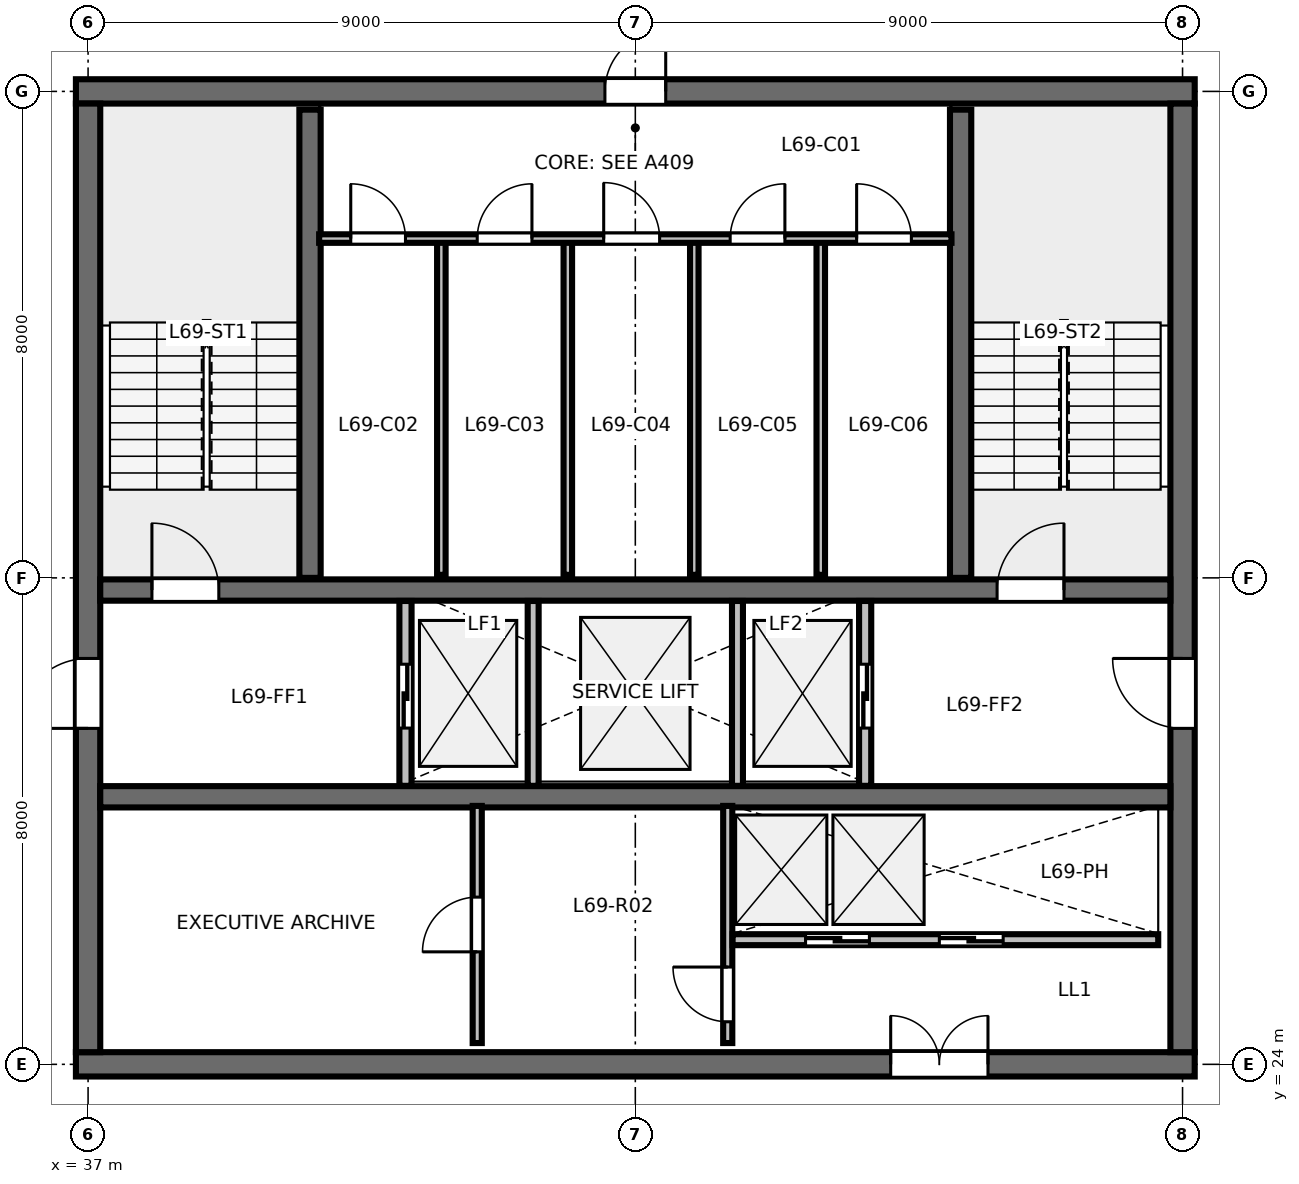
"""IFC4 building model, lengths in metres.
Left out: names, types, materials, properties, quantities, classifications, styles, units other than length and angle.
Written with IfcOpenShell. Run it as: python <this file> out.ifc"""

import sys

from ifc_helpers import new_model, si_unit, direction, frame, frame_2d, origin, place, context, subcontext, project, spatial, rectangle, extrude, element, fill, save


model = new_model("IFC4")
c1 = context("Model", 3, precision=1e-05, world=origin(), true_north=direction((0.0, 1.0)))
c2 = subcontext(c1, "Body", "Model", "MODEL_VIEW")
j1 = project(units=[si_unit("LENGTHUNIT", "METRE"), si_unit("PLANEANGLEUNIT", "RADIAN")], contexts=[c1])
p1 = place(None, origin())
s1 = spatial("IfcSite", under=j1, at=p1, CompositionType="ELEMENT")
p2 = place(p1, origin())
s2 = spatial("IfcBuilding", under=s1, at=p2, CompositionType="ELEMENT")
p3 = place(p2, frame((0.0, 0.0, 261.0)))
s3 = spatial("IfcBuildingStorey", under=s2, at=p3, CompositionType="ELEMENT", Elevation=261.0)
p4 = place(p3, frame((36.8, 24.0, 0.0), z_axis=(0.0, 0.0, 1.0), x_axis=(1.0, 0.0, 0.0)))
e1 = element("IfcWall", 1, at=p4, inside=s3, PredefinedType="SHEAR", context=c2, shape_type="SweptSolid", body=[
    extrude(rectangle(XDim=18.4, YDim=0.4, at=frame_2d((9.2, 0.0))), origin(), (0.0, 0.0, 1.0), 3.36),
])
p5 = place(p4, frame((13.4, 0.0, 0.0)))
e2 = element("IfcOpeningElement", 2, at=p5, cuts=e1, PredefinedType="OPENING", context=c2, shape_type="SweptSolid", body=[
    extrude(rectangle(XDim=1.6, YDim=2.15, at=frame_2d((0.8, 1.075))), frame((0.0, 0.21, 0.0), z_axis=(0.0, -1.0, 0.0), x_axis=(1.0, 0.0, 0.0)), (0.0, 0.0, 1.0), 0.42),
])
p6 = place(p3, frame((36.8, 40.0, 0.0), z_axis=(0.0, 0.0, 1.0), x_axis=(1.0, 0.0, 0.0)))
e3 = element("IfcWall", 3, at=p6, inside=s3, PredefinedType="SHEAR", context=c2, shape_type="SweptSolid", body=[
    extrude(rectangle(XDim=18.4, YDim=0.4, at=frame_2d((9.2, 0.0))), origin(), (0.0, 0.0, 1.0), 3.36),
])
p7 = place(p6, frame((8.7, 0.0, 0.0)))
e4 = element("IfcOpeningElement", 4, at=p7, cuts=e3, PredefinedType="OPENING", context=c2, shape_type="SweptSolid", body=[
    extrude(rectangle(XDim=1.0, YDim=2.15, at=frame_2d((0.5, 1.075))), frame((0.0, 0.21, 0.0), z_axis=(0.0, -1.0, 0.0), x_axis=(1.0, 0.0, 0.0)), (0.0, 0.0, 1.0), 0.42),
])
p8 = place(p3, frame((37.0, 24.2, 0.0), z_axis=(0.0, 0.0, 1.0), x_axis=(0.0, 1.0, 0.0)))
e5 = element("IfcWall", 5, at=p8, inside=s3, PredefinedType="SHEAR", context=c2, shape_type="SweptSolid", body=[
    extrude(rectangle(XDim=15.6, YDim=0.4, at=frame_2d((7.8, 0.0))), origin(), (0.0, 0.0, 1.0), 3.36),
])
p9 = place(p8, frame((5.325, 0.0, 0.0)))
e6 = element("IfcOpeningElement", 6, at=p9, cuts=e5, PredefinedType="OPENING", context=c2, shape_type="SweptSolid", body=[
    extrude(rectangle(XDim=1.15, YDim=2.15, at=frame_2d((0.575, 1.075))), frame((0.0, 0.21, 0.0), z_axis=(0.0, -1.0, 0.0), x_axis=(1.0, 0.0, 0.0)), (0.0, 0.0, 1.0), 0.42),
])
p10 = place(p3, frame((55.0, 24.2, 0.0), z_axis=(0.0, 0.0, 1.0), x_axis=(0.0, 1.0, 0.0)))
e7 = element("IfcWall", 7, at=p10, inside=s3, PredefinedType="SHEAR", context=c2, shape_type="SweptSolid", body=[
    extrude(rectangle(XDim=15.6, YDim=0.4, at=frame_2d((7.8, 0.0))), origin(), (0.0, 0.0, 1.0), 3.36),
])
p11 = place(p10, frame((5.325, 0.0, 0.0)))
e8 = element("IfcOpeningElement", 8, at=p11, cuts=e7, PredefinedType="OPENING", context=c2, shape_type="SweptSolid", body=[
    extrude(rectangle(XDim=1.15, YDim=2.15, at=frame_2d((0.575, 1.075))), frame((0.0, 0.21, 0.0), z_axis=(0.0, -1.0, 0.0), x_axis=(1.0, 0.0, 0.0)), (0.0, 0.0, 1.0), 0.42),
])
p12 = place(p3, frame((37.2, 31.8, 0.0), z_axis=(0.0, 0.0, 1.0), x_axis=(1.0, 0.0, 0.0)))
e9 = element("IfcWall", 9, at=p12, inside=s3, PredefinedType="SHEAR", context=c2, shape_type="SweptSolid", body=[
    extrude(rectangle(XDim=17.6, YDim=0.35, at=frame_2d((8.8, 0.0))), origin(), (0.0, 0.0, 1.0), 3.36),
])
p13 = place(p12, frame((0.85, 0.0, 0.0)))
e10 = element("IfcOpeningElement", 10, at=p13, cuts=e9, PredefinedType="OPENING", context=c2, shape_type="SweptSolid", body=[
    extrude(rectangle(XDim=1.1, YDim=2.15, at=frame_2d((0.55, 1.075))), frame((0.0, 0.185, 0.0), z_axis=(0.0, -1.0, 0.0), x_axis=(1.0, 0.0, 0.0)), (0.0, 0.0, 1.0), 0.37),
])
p14 = place(p12, frame((14.75, 0.0, 0.0)))
e11 = element("IfcOpeningElement", 11, at=p14, cuts=e9, PredefinedType="OPENING", context=c2, shape_type="SweptSolid", body=[
    extrude(rectangle(XDim=1.1, YDim=2.15, at=frame_2d((0.55, 1.075))), frame((0.0, 0.185, 0.0), z_axis=(0.0, -1.0, 0.0), x_axis=(1.0, 0.0, 0.0)), (0.0, 0.0, 1.0), 0.37),
])
p15 = place(p3, frame((37.2, 28.4, 0.0), z_axis=(0.0, 0.0, 1.0), x_axis=(1.0, 0.0, 0.0)))
e12 = element("IfcWall", 12, at=p15, inside=s3, PredefinedType="SHEAR", context=c2, shape_type="SweptSolid", body=[
    extrude(rectangle(XDim=17.6, YDim=0.35, at=frame_2d((8.8, 0.0))), origin(), (0.0, 0.0, 1.0), 3.36),
])
for number, where, z_axis, x_axis in (
    (13, (40.65, 32.0, 0.0), (0.0, 0.0, 1.0), (0.0, 1.0, 0.0)),
    (14, (51.35, 32.0, 0.0), (0.0, 0.0, 1.0), (0.0, 1.0, 0.0)),
):
    element("IfcWall", number, at=place(p3, frame(where, z_axis=z_axis, x_axis=x_axis)), inside=s3, PredefinedType="SHEAR", context=c2, shape_type="SweptSolid", body=[
        extrude(rectangle(XDim=7.7, YDim=0.35, at=frame_2d((3.85, 0.0))), origin(), (0.0, 0.0, 1.0), 3.6),
    ])
for number, where, z_axis, x_axis in (
    (15, (42.81, 32.05, 0.0), (0.0, 0.0, 1.0), (0.0, 1.0, 0.0)),
    (16, (44.89, 32.05, 0.0), (0.0, 0.0, 1.0), (0.0, 1.0, 0.0)),
    (17, (46.97, 32.05, 0.0), (0.0, 0.0, 1.0), (0.0, 1.0, 0.0)),
    (18, (49.05, 32.05, 0.0), (0.0, 0.0, 1.0), (0.0, 1.0, 0.0)),
):
    element("IfcWall", number, at=place(p3, frame(where, z_axis=z_axis, x_axis=x_axis)), inside=s3, PredefinedType="PARTITIONING", context=c2, shape_type="SweptSolid", body=[
        extrude(rectangle(XDim=5.5, YDim=0.14, at=frame_2d((2.75, 0.0))), origin(), (0.0, 0.0, 1.0), 3.375),
    ])
p16 = place(p3, frame((40.8, 37.58, 0.0), z_axis=(0.0, 0.0, 1.0), x_axis=(1.0, 0.0, 0.0)))
e19 = element("IfcWall", 19, at=p16, inside=s3, PredefinedType="PARTITIONING", context=c2, shape_type="SweptSolid", body=[
    extrude(rectangle(XDim=10.4, YDim=0.14, at=frame_2d((5.2, 0.0))), origin(), (0.0, 0.0, 1.0), 3.375),
])
p17 = place(p16, frame((0.52, 0.0, 0.0)))
e20 = element("IfcOpeningElement", 20, at=p17, cuts=e19, PredefinedType="OPENING", context=c2, shape_type="SweptSolid", body=[
    extrude(rectangle(XDim=0.9, YDim=2.15, at=frame_2d((0.45, 1.075))), frame((0.0, 0.08, 0.0), z_axis=(0.0, -1.0, 0.0), x_axis=(1.0, 0.0, 0.0)), (0.0, 0.0, 1.0), 0.16),
])
p18 = place(p16, frame((2.6, 0.0, 0.0)))
e21 = element("IfcOpeningElement", 21, at=p18, cuts=e19, PredefinedType="OPENING", context=c2, shape_type="SweptSolid", body=[
    extrude(rectangle(XDim=0.9, YDim=2.15, at=frame_2d((0.45, 1.075))), frame((0.0, 0.08, 0.0), z_axis=(0.0, -1.0, 0.0), x_axis=(1.0, 0.0, 0.0)), (0.0, 0.0, 1.0), 0.16),
])
p19 = place(p16, frame((4.68, 0.0, 0.0)))
e22 = element("IfcOpeningElement", 22, at=p19, cuts=e19, PredefinedType="OPENING", context=c2, shape_type="SweptSolid", body=[
    extrude(rectangle(XDim=0.92, YDim=2.15, at=frame_2d((0.46, 1.075))), frame((0.0, 0.08, 0.0), z_axis=(0.0, -1.0, 0.0), x_axis=(1.0, 0.0, 0.0)), (0.0, 0.0, 1.0), 0.16),
])
p20 = place(p16, frame((6.76, 0.0, 0.0)))
e23 = element("IfcOpeningElement", 23, at=p20, cuts=e19, PredefinedType="OPENING", context=c2, shape_type="SweptSolid", body=[
    extrude(rectangle(XDim=0.9, YDim=2.15, at=frame_2d((0.45, 1.075))), frame((0.0, 0.08, 0.0), z_axis=(0.0, -1.0, 0.0), x_axis=(1.0, 0.0, 0.0)), (0.0, 0.0, 1.0), 0.16),
])
p21 = place(p16, frame((8.84, 0.0, 0.0)))
e24 = element("IfcOpeningElement", 24, at=p21, cuts=e19, PredefinedType="OPENING", context=c2, shape_type="SweptSolid", body=[
    extrude(rectangle(XDim=0.9, YDim=2.15, at=frame_2d((0.45, 1.075))), frame((0.0, 0.08, 0.0), z_axis=(0.0, -1.0, 0.0), x_axis=(1.0, 0.0, 0.0)), (0.0, 0.0, 1.0), 0.16),
])
p22 = place(p3, frame((42.22, 28.58, 0.0), z_axis=(0.0, 0.0, 1.0), x_axis=(0.0, 1.0, 0.0)))
e25 = element("IfcWall", 25, at=p22, inside=s3, PredefinedType="PARTITIONING", context=c2, shape_type="SweptSolid", body=[
    extrude(rectangle(XDim=3.04, YDim=0.2, at=frame_2d((1.52, 0.0))), origin(), (0.0, 0.0, 1.0), 3.375),
])
p23 = place(p22, frame((0.95, 0.0, 0.0)))
e26 = element("IfcOpeningElement", 26, at=p23, cuts=e25, PredefinedType="OPENING", context=c2, shape_type="SweptSolid", body=[
    extrude(rectangle(XDim=1.05, YDim=2.15, at=frame_2d((0.525, 1.075))), frame((0.0, 0.11, 0.0), z_axis=(0.0, -1.0, 0.0), x_axis=(1.0, 0.0, 0.0)), (0.0, 0.0, 1.0), 0.22),
])
p24 = place(p3, frame((49.78, 28.58, 0.0), z_axis=(0.0, 0.0, 1.0), x_axis=(0.0, 1.0, 0.0)))
e27 = element("IfcWall", 27, at=p24, inside=s3, PredefinedType="PARTITIONING", context=c2, shape_type="SweptSolid", body=[
    extrude(rectangle(XDim=3.04, YDim=0.2, at=frame_2d((1.52, 0.0))), origin(), (0.0, 0.0, 1.0), 3.375),
])
p25 = place(p24, frame((0.95, 0.0, 0.0)))
e28 = element("IfcOpeningElement", 28, at=p25, cuts=e27, PredefinedType="OPENING", context=c2, shape_type="SweptSolid", body=[
    extrude(rectangle(XDim=1.05, YDim=2.15, at=frame_2d((0.525, 1.075))), frame((0.0, 0.11, 0.0), z_axis=(0.0, -1.0, 0.0), x_axis=(1.0, 0.0, 0.0)), (0.0, 0.0, 1.0), 0.22),
])
for number, where, z_axis, x_axis in (
    (29, (44.32, 28.58, 0.0), (0.0, 0.0, 1.0), (0.0, 1.0, 0.0)),
    (30, (47.68, 28.58, 0.0), (0.0, 0.0, 1.0), (0.0, 1.0, 0.0)),
):
    element("IfcWall", number, at=place(p3, frame(where, z_axis=z_axis, x_axis=x_axis)), inside=s3, PredefinedType="PARTITIONING", context=c2, shape_type="SweptSolid", body=[
        extrude(rectangle(XDim=3.04, YDim=0.18, at=frame_2d((1.52, 0.0))), origin(), (0.0, 0.0, 1.0), 3.375),
    ])
p26 = place(p3, frame((43.4, 24.35, 0.0), z_axis=(0.0, 0.0, 1.0), x_axis=(0.0, 1.0, 0.0)))
e31 = element("IfcWall", 31, at=p26, inside=s3, PredefinedType="PARTITIONING", context=c2, shape_type="SweptSolid", body=[
    extrude(rectangle(XDim=3.9, YDim=0.15, at=frame_2d((1.95, 0.0))), origin(), (0.0, 0.0, 1.0), 3.375),
])
p27 = place(p26, frame((1.5, 0.0, 0.0)))
e32 = element("IfcOpeningElement", 32, at=p27, cuts=e31, PredefinedType="OPENING", context=c2, shape_type="SweptSolid", body=[
    extrude(rectangle(XDim=0.9, YDim=2.15, at=frame_2d((0.45, 1.075))), frame((0.0, 0.085, 0.0), z_axis=(0.0, -1.0, 0.0), x_axis=(1.0, 0.0, 0.0)), (0.0, 0.0, 1.0), 0.17),
])
p28 = place(p3, frame((47.52, 24.35, 0.0), z_axis=(0.0, 0.0, 1.0), x_axis=(0.0, 1.0, 0.0)))
e33 = element("IfcWall", 33, at=p28, inside=s3, PredefinedType="PARTITIONING", context=c2, shape_type="SweptSolid", body=[
    extrude(rectangle(XDim=3.9, YDim=0.15, at=frame_2d((1.95, 0.0))), origin(), (0.0, 0.0, 1.0), 3.375),
])
p29 = place(p28, frame((0.35, 0.0, 0.0)))
e34 = element("IfcOpeningElement", 34, at=p29, cuts=e33, PredefinedType="OPENING", context=c2, shape_type="SweptSolid", body=[
    extrude(rectangle(XDim=0.9, YDim=2.15, at=frame_2d((0.45, 1.075))), frame((0.0, 0.085, 0.0), z_axis=(0.0, -1.0, 0.0), x_axis=(1.0, 0.0, 0.0)), (0.0, 0.0, 1.0), 0.17),
])
p30 = place(p3, frame((47.6, 26.05, 0.0), z_axis=(0.0, 0.0, 1.0), x_axis=(1.0, 0.0, 0.0)))
e35 = element("IfcWall", 35, at=p30, inside=s3, PredefinedType="PARTITIONING", context=c2, shape_type="SweptSolid", body=[
    extrude(rectangle(XDim=7.0, YDim=0.18, at=frame_2d((3.5, 0.0))), origin(), (0.0, 0.0, 1.0), 3.375),
])
p31 = place(p30, frame((1.2, 0.0, 0.0)))
e36 = element("IfcOpeningElement", 36, at=p31, cuts=e35, PredefinedType="OPENING", context=c2, shape_type="SweptSolid", body=[
    extrude(rectangle(XDim=1.05, YDim=2.15, at=frame_2d((0.525, 1.075))), frame((0.0, 0.1, 0.0), z_axis=(0.0, -1.0, 0.0), x_axis=(1.0, 0.0, 0.0)), (0.0, 0.0, 1.0), 0.2),
])
p32 = place(p30, frame((3.4, 0.0, 0.0)))
e37 = element("IfcOpeningElement", 37, at=p32, cuts=e35, PredefinedType="OPENING", context=c2, shape_type="SweptSolid", body=[
    extrude(rectangle(XDim=1.05, YDim=2.15, at=frame_2d((0.525, 1.075))), frame((0.0, 0.1, 0.0), z_axis=(0.0, -1.0, 0.0), x_axis=(1.0, 0.0, 0.0)), (0.0, 0.0, 1.0), 0.2),
])
p33 = place(p13, origin())
e38 = element("IfcDoor", 38, at=p33, inside=s3, OperationType="SINGLE_SWING_LEFT", PredefinedType="DOOR", context=c2, shape_type="SweptSolid", body=[
    extrude(rectangle(XDim=1.1, YDim=2.15, at=frame_2d((0.55, 1.075))), frame((0.0, 0.025, 0.0), z_axis=(0.0, -1.0, 0.0), x_axis=(1.0, 0.0, 0.0)), (0.0, 0.0, 1.0), 0.05),
])
fill(e10, e38)
p34 = place(p14, origin())
e39 = element("IfcDoor", 39, at=p34, inside=s3, OperationType="SINGLE_SWING_RIGHT", PredefinedType="DOOR", context=c2, shape_type="SweptSolid", body=[
    extrude(rectangle(XDim=1.1, YDim=2.15, at=frame_2d((0.55, 1.075))), frame((0.0, 0.025, 0.0), z_axis=(0.0, -1.0, 0.0), x_axis=(1.0, 0.0, 0.0)), (0.0, 0.0, 1.0), 0.05),
])
fill(e11, e39)
p35 = place(p7, origin())
e40 = element("IfcDoor", 40, at=p35, inside=s3, OperationType="SINGLE_SWING_RIGHT", PredefinedType="DOOR", context=c2, shape_type="SweptSolid", body=[
    extrude(rectangle(XDim=1.0, YDim=2.15, at=frame_2d((0.5, 1.075))), frame((0.0, 0.025, 0.0), z_axis=(0.0, -1.0, 0.0), x_axis=(1.0, 0.0, 0.0)), (0.0, 0.0, 1.0), 0.05),
])
fill(e4, e40)
p36 = place(p9, origin())
e41 = element("IfcDoor", 41, at=p36, inside=s3, OperationType="SINGLE_SWING_LEFT", PredefinedType="DOOR", context=c2, shape_type="SweptSolid", body=[
    extrude(rectangle(XDim=1.15, YDim=2.15, at=frame_2d((0.575, 1.075))), frame((0.0, 0.025, 0.0), z_axis=(0.0, -1.0, 0.0), x_axis=(1.0, 0.0, 0.0)), (0.0, 0.0, 1.0), 0.05),
])
fill(e6, e41)
p37 = place(p11, origin())
e42 = element("IfcDoor", 42, at=p37, inside=s3, OperationType="SINGLE_SWING_RIGHT", PredefinedType="DOOR", context=c2, shape_type="SweptSolid", body=[
    extrude(rectangle(XDim=1.15, YDim=2.15, at=frame_2d((0.575, 1.075))), frame((0.0, 0.025, 0.0), z_axis=(0.0, -1.0, 0.0), x_axis=(1.0, 0.0, 0.0)), (0.0, 0.0, 1.0), 0.05),
])
fill(e8, e42)
p38 = place(p5, origin())
e43 = element("IfcDoor", 43, at=p38, inside=s3, OperationType="DOUBLE_DOOR_SINGLE_SWING", PredefinedType="DOOR", context=c2, shape_type="SweptSolid", body=[
    extrude(rectangle(XDim=1.6, YDim=2.15, at=frame_2d((0.8, 1.075))), frame((0.0, 0.025, 0.0), z_axis=(0.0, -1.0, 0.0), x_axis=(1.0, 0.0, 0.0)), (0.0, 0.0, 1.0), 0.05),
])
fill(e2, e43)
p39 = place(p17, origin())
e44 = element("IfcDoor", 44, at=p39, inside=s3, OperationType="SINGLE_SWING_LEFT", PredefinedType="DOOR", context=c2, shape_type="SweptSolid", body=[
    extrude(rectangle(XDim=0.9, YDim=2.15, at=frame_2d((0.45, 1.075))), frame((0.0, 0.025, 0.0), z_axis=(0.0, -1.0, 0.0), x_axis=(1.0, 0.0, 0.0)), (0.0, 0.0, 1.0), 0.05),
])
fill(e20, e44)
p40 = place(p18, origin())
e45 = element("IfcDoor", 45, at=p40, inside=s3, OperationType="SINGLE_SWING_RIGHT", PredefinedType="DOOR", context=c2, shape_type="SweptSolid", body=[
    extrude(rectangle(XDim=0.9, YDim=2.15, at=frame_2d((0.45, 1.075))), frame((0.0, 0.025, 0.0), z_axis=(0.0, -1.0, 0.0), x_axis=(1.0, 0.0, 0.0)), (0.0, 0.0, 1.0), 0.05),
])
fill(e21, e45)
p41 = place(p19, origin())
e46 = element("IfcDoor", 46, at=p41, inside=s3, OperationType="SINGLE_SWING_LEFT", PredefinedType="DOOR", context=c2, shape_type="SweptSolid", body=[
    extrude(rectangle(XDim=0.92, YDim=2.15, at=frame_2d((0.46, 1.075))), frame((0.0, 0.025, 0.0), z_axis=(0.0, -1.0, 0.0), x_axis=(1.0, 0.0, 0.0)), (0.0, 0.0, 1.0), 0.05),
])
fill(e22, e46)
p42 = place(p20, origin())
e47 = element("IfcDoor", 47, at=p42, inside=s3, OperationType="SINGLE_SWING_RIGHT", PredefinedType="DOOR", context=c2, shape_type="SweptSolid", body=[
    extrude(rectangle(XDim=0.9, YDim=2.15, at=frame_2d((0.45, 1.075))), frame((0.0, 0.025, 0.0), z_axis=(0.0, -1.0, 0.0), x_axis=(1.0, 0.0, 0.0)), (0.0, 0.0, 1.0), 0.05),
])
fill(e23, e47)
p43 = place(p21, origin())
e48 = element("IfcDoor", 48, at=p43, inside=s3, OperationType="SINGLE_SWING_LEFT", PredefinedType="DOOR", context=c2, shape_type="SweptSolid", body=[
    extrude(rectangle(XDim=0.9, YDim=2.15, at=frame_2d((0.45, 1.075))), frame((0.0, 0.025, 0.0), z_axis=(0.0, -1.0, 0.0), x_axis=(1.0, 0.0, 0.0)), (0.0, 0.0, 1.0), 0.05),
])
fill(e24, e48)
p44 = place(p23, origin())
e49 = element("IfcDoor", 49, at=p44, inside=s3, OperationType="SLIDING_TO_LEFT", PredefinedType="DOOR", context=c2, shape_type="SweptSolid", body=[
    extrude(rectangle(XDim=1.05, YDim=2.15, at=frame_2d((0.525, 1.075))), frame((0.0, 0.025, 0.0), z_axis=(0.0, -1.0, 0.0), x_axis=(1.0, 0.0, 0.0)), (0.0, 0.0, 1.0), 0.05),
])
fill(e26, e49)
p45 = place(p25, origin())
e50 = element("IfcDoor", 50, at=p45, inside=s3, OperationType="SLIDING_TO_RIGHT", PredefinedType="DOOR", context=c2, shape_type="SweptSolid", body=[
    extrude(rectangle(XDim=1.05, YDim=2.15, at=frame_2d((0.525, 1.075))), frame((0.0, 0.025, 0.0), z_axis=(0.0, -1.0, 0.0), x_axis=(1.0, 0.0, 0.0)), (0.0, 0.0, 1.0), 0.05),
])
fill(e28, e50)
p46 = place(p27, origin())
e51 = element("IfcDoor", 51, at=p46, inside=s3, OperationType="SINGLE_SWING_LEFT", PredefinedType="DOOR", context=c2, shape_type="SweptSolid", body=[
    extrude(rectangle(XDim=0.9, YDim=2.15, at=frame_2d((0.45, 1.075))), frame((0.0, 0.025, 0.0), z_axis=(0.0, -1.0, 0.0), x_axis=(1.0, 0.0, 0.0)), (0.0, 0.0, 1.0), 0.05),
])
fill(e32, e51)
p47 = place(p29, origin())
e52 = element("IfcDoor", 52, at=p47, inside=s3, OperationType="SINGLE_SWING_RIGHT", PredefinedType="DOOR", context=c2, shape_type="SweptSolid", body=[
    extrude(rectangle(XDim=0.9, YDim=2.15, at=frame_2d((0.45, 1.075))), frame((0.0, 0.025, 0.0), z_axis=(0.0, -1.0, 0.0), x_axis=(1.0, 0.0, 0.0)), (0.0, 0.0, 1.0), 0.05),
])
fill(e34, e52)
p48 = place(p31, origin())
e53 = element("IfcDoor", 53, at=p48, inside=s3, OperationType="SLIDING_TO_LEFT", PredefinedType="DOOR", context=c2, shape_type="SweptSolid", body=[
    extrude(rectangle(XDim=1.05, YDim=2.15, at=frame_2d((0.525, 1.075))), frame((0.0, 0.025, 0.0), z_axis=(0.0, -1.0, 0.0), x_axis=(1.0, 0.0, 0.0)), (0.0, 0.0, 1.0), 0.05),
])
fill(e36, e53)
p49 = place(p32, origin())
e54 = element("IfcDoor", 54, at=p49, inside=s3, OperationType="SLIDING_TO_RIGHT", PredefinedType="DOOR", context=c2, shape_type="SweptSolid", body=[
    extrude(rectangle(XDim=1.05, YDim=2.15, at=frame_2d((0.525, 1.075))), frame((0.0, 0.025, 0.0), z_axis=(0.0, -1.0, 0.0), x_axis=(1.0, 0.0, 0.0)), (0.0, 0.0, 1.0), 0.05),
])
fill(e37, e54)
save(model, sys.argv[1])
